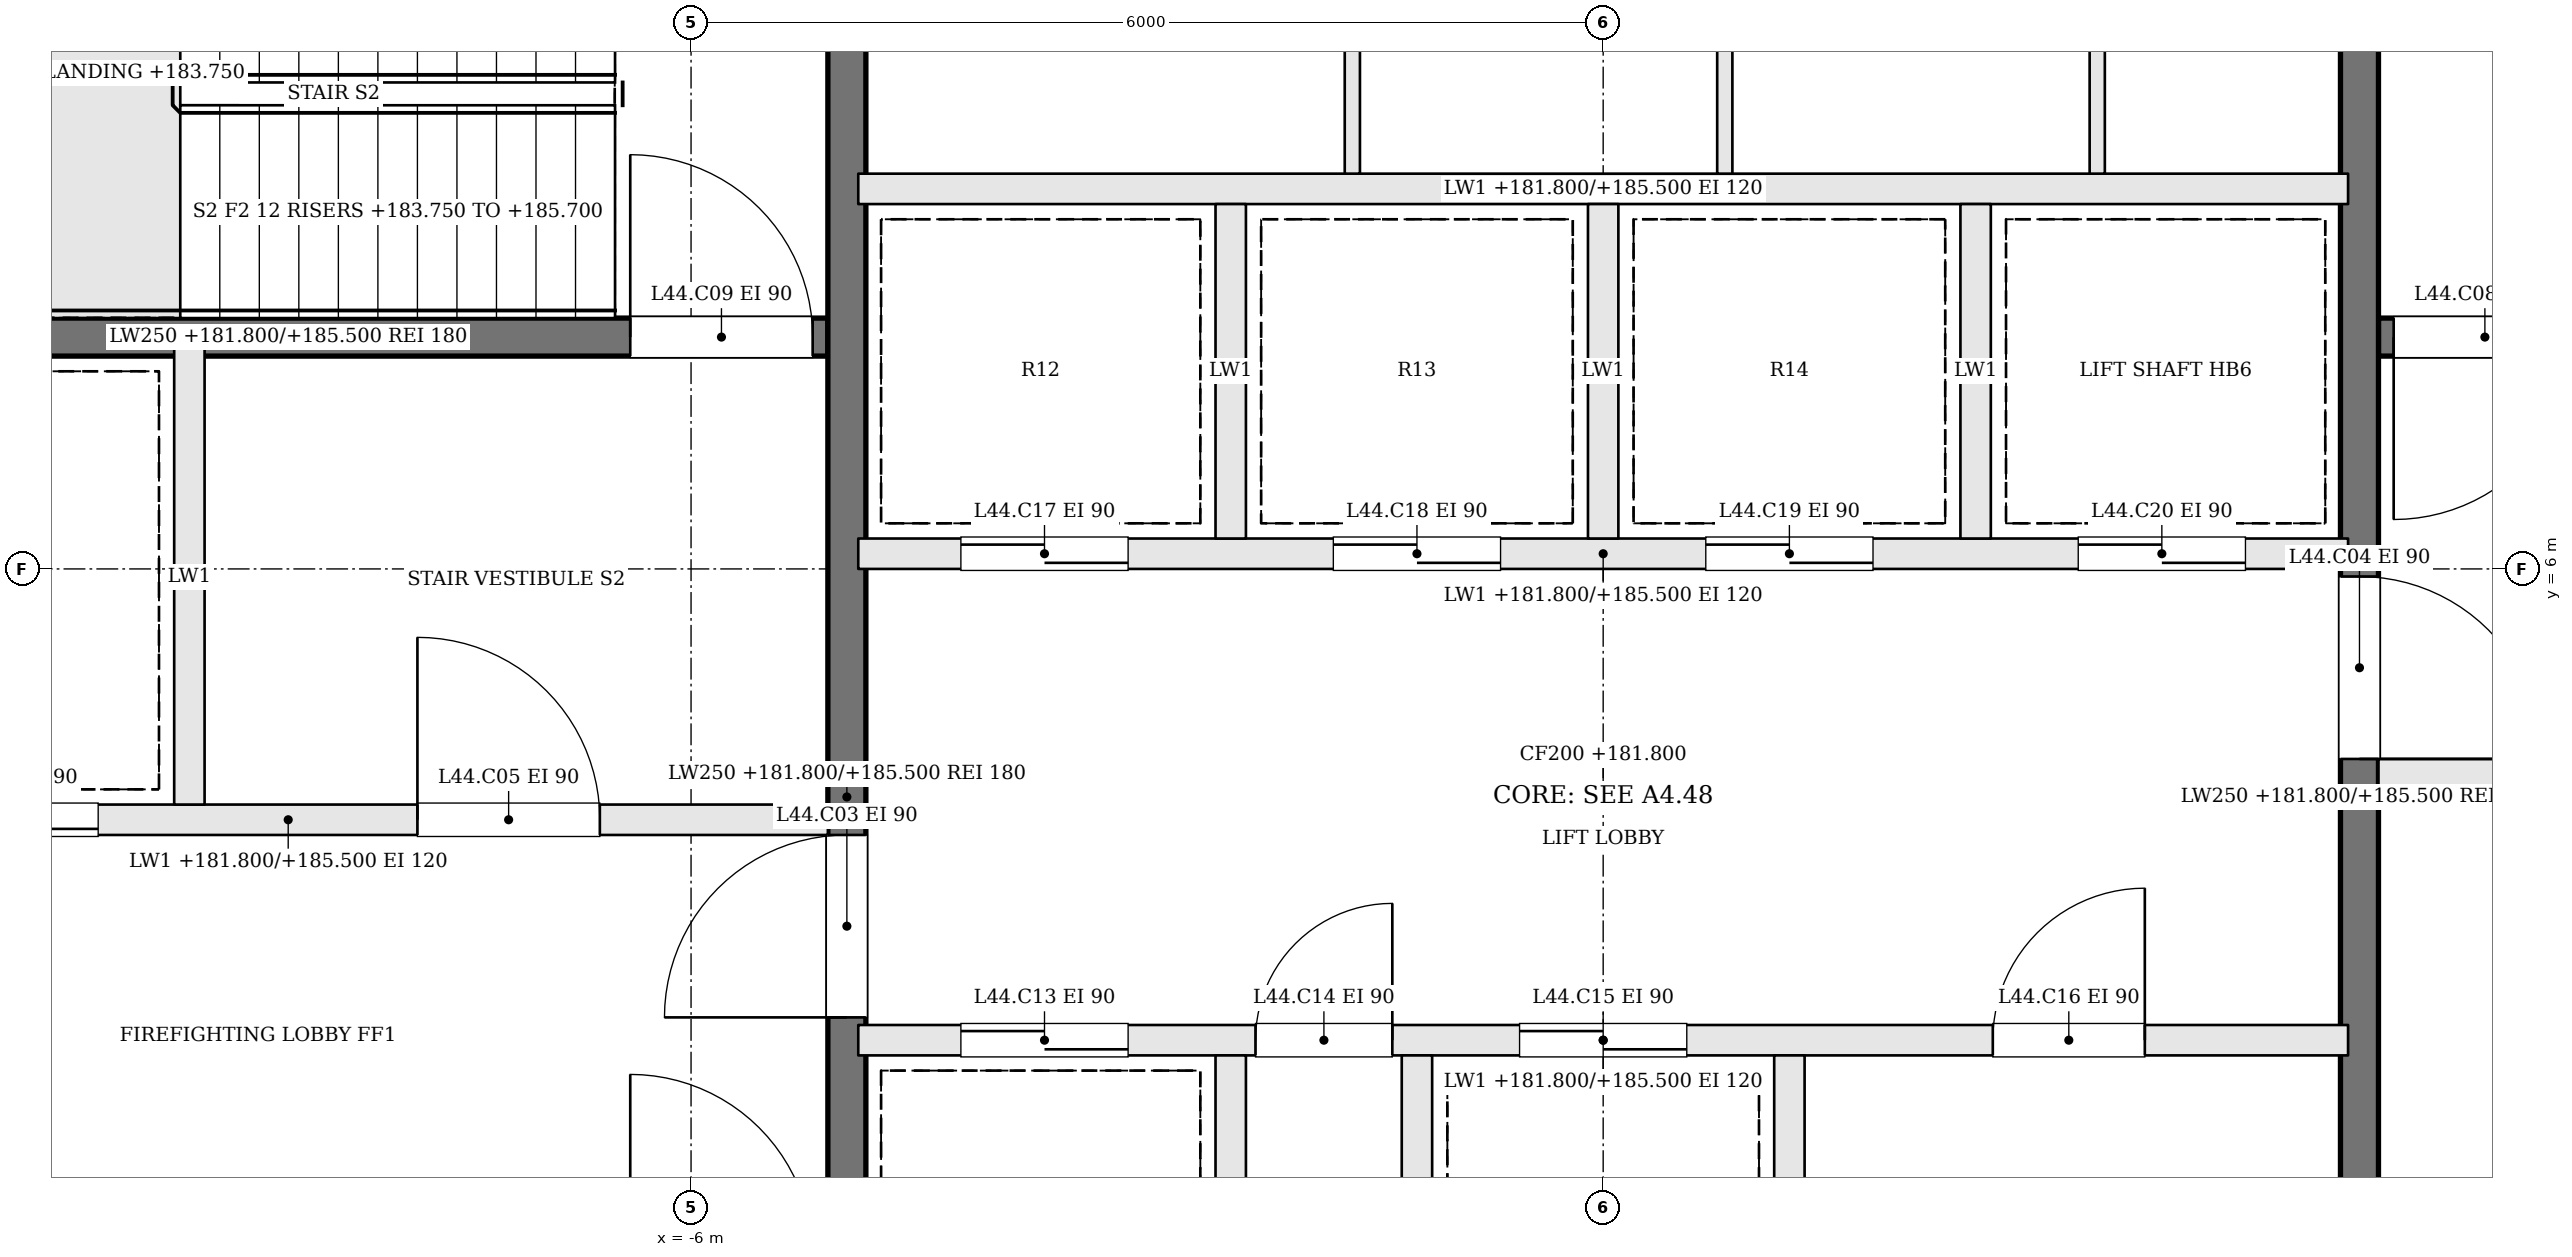
"""IFC4 building model, lengths in metres.
Left out: names, types, materials, properties, quantities, classifications, styles, units other than length and angle.
Written with IfcOpenShell. Run it as: python <this file> out.ifc"""

import sys

from ifc_helpers import new_model, si_unit, direction, frame, frame_2d, origin, place, context, subcontext, project, spatial, rectangle, extrude, element, fill, save


model = new_model("IFC4")
c1 = context("Model", 3, precision=1e-05, world=origin(), true_north=direction((0.0, 1.0)))
c2 = subcontext(c1, "Body", "Model", "MODEL_VIEW")
j1 = project(units=[si_unit("LENGTHUNIT", "METRE"), si_unit("PLANEANGLEUNIT", "RADIAN")], contexts=[c1])
p1 = place(None, origin())
s1 = spatial("IfcSite", under=j1, at=p1, CompositionType="ELEMENT")
p2 = place(p1, origin())
s2 = spatial("IfcBuilding", under=s1, at=p2, CompositionType="ELEMENT")
p3 = place(p2, frame((0.0, 0.0, 181.8)))
s3 = spatial("IfcBuildingStorey", under=s2, at=p3, CompositionType="ELEMENT", Elevation=181.8)
p4 = place(p3, frame((12.2, 7.525, 0.0), z_axis=(0.0, 0.0, 1.0), x_axis=(-1.0, 0.0, 0.0)))
e1 = element("IfcWall", 1, at=p4, inside=s3, PredefinedType="SOLIDWALL", context=c2, shape_type="SweptSolid", body=[
    extrude(rectangle(XDim=7.1, YDim=0.25, at=frame_2d((3.55, 0.0))), origin(), (0.0, 0.0, 1.0), 3.7),
])
p5 = place(p4, frame((5.8, 0.0, 0.0)))
e2 = element("IfcOpeningElement", 2, at=p5, cuts=e1, PredefinedType="OPENING", context=c2, shape_type="SweptSolid", body=[
    extrude(rectangle(XDim=1.2, YDim=2.1, at=frame_2d((0.6, 1.05))), frame((0.0, 0.135, 0.0), z_axis=(0.0, -1.0, 0.0), x_axis=(1.0, 0.0, 0.0)), (0.0, 0.0, 1.0), 0.27),
])
p6 = place(p3, frame((-12.2, 4.35, 0.0), z_axis=(0.0, 0.0, 1.0), x_axis=(1.0, 0.0, 0.0)))
e3 = element("IfcWall", 3, at=p6, inside=s3, PredefinedType="SOLIDWALL", context=c2, shape_type="SweptSolid", body=[
    extrude(rectangle(XDim=7.1, YDim=0.2, at=frame_2d((3.55, 0.0))), origin(), (0.0, 0.0, 1.0), 3.7),
])
p7 = place(p6, frame((4.4, 0.0, 0.0)))
e4 = element("IfcOpeningElement", 4, at=p7, cuts=e3, PredefinedType="OPENING", context=c2, shape_type="SweptSolid", body=[
    extrude(rectangle(XDim=1.2, YDim=2.1, at=frame_2d((0.6, 1.05))), frame((0.0, 0.11, 0.0), z_axis=(0.0, -1.0, 0.0), x_axis=(1.0, 0.0, 0.0)), (0.0, 0.0, 1.0), 0.22),
])
p8 = place(p6, frame((1.1, 0.0, 0.0)))
e5 = element("IfcOpeningElement", 5, at=p8, cuts=e3, PredefinedType="OPENING", context=c2, shape_type="SweptSolid", body=[
    extrude(rectangle(XDim=1.2, YDim=2.1, at=frame_2d((0.6, 1.05))), frame((0.0, 0.11, 0.0), z_axis=(0.0, -1.0, 0.0), x_axis=(1.0, 0.0, 0.0)), (0.0, 0.0, 1.0), 0.22),
])
p9 = place(p3, frame((12.2, 4.65, 0.0), z_axis=(0.0, 0.0, 1.0), x_axis=(-1.0, 0.0, 0.0)))
e6 = element("IfcWall", 6, at=p9, inside=s3, PredefinedType="SOLIDWALL", context=c2, shape_type="SweptSolid", body=[
    extrude(rectangle(XDim=7.1, YDim=0.2, at=frame_2d((3.55, 0.0))), origin(), (0.0, 0.0, 1.0), 3.7),
])
p10 = place(p9, frame((4.4, 0.0, 0.0)))
e7 = element("IfcOpeningElement", 7, at=p10, cuts=e6, PredefinedType="OPENING", context=c2, shape_type="SweptSolid", body=[
    extrude(rectangle(XDim=1.2, YDim=2.1, at=frame_2d((0.6, 1.05))), frame((0.0, 0.11, 0.0), z_axis=(0.0, -1.0, 0.0), x_axis=(1.0, 0.0, 0.0)), (0.0, 0.0, 1.0), 0.22),
])
p11 = place(p9, frame((1.1, 0.0, 0.0)))
e8 = element("IfcOpeningElement", 8, at=p11, cuts=e6, PredefinedType="OPENING", context=c2, shape_type="SweptSolid", body=[
    extrude(rectangle(XDim=1.2, YDim=2.1, at=frame_2d((0.6, 1.05))), frame((0.0, 0.11, 0.0), z_axis=(0.0, -1.0, 0.0), x_axis=(1.0, 0.0, 0.0)), (0.0, 0.0, 1.0), 0.22),
])
p12 = place(p3, frame((-12.2, 7.525, 0.0), z_axis=(0.0, 0.0, 1.0), x_axis=(1.0, 0.0, 0.0)))
e9 = element("IfcWall", 9, at=p12, inside=s3, PredefinedType="SOLIDWALL", context=c2, shape_type="SweptSolid", body=[
    extrude(rectangle(XDim=7.1, YDim=0.25, at=frame_2d((3.55, 0.0))), origin(), (0.0, 0.0, 1.0), 3.7),
])
p13 = place(p12, frame((5.8, 0.0, 0.0)))
e10 = element("IfcOpeningElement", 10, at=p13, cuts=e9, PredefinedType="OPENING", context=c2, shape_type="SweptSolid", body=[
    extrude(rectangle(XDim=1.2, YDim=2.1, at=frame_2d((0.6, 1.05))), frame((0.0, 0.135, 0.0), z_axis=(0.0, -1.0, 0.0), x_axis=(1.0, 0.0, 0.0)), (0.0, 0.0, 1.0), 0.27),
])
p14 = place(p3, frame((-9.3, 4.45, 0.0), z_axis=(0.0, 0.0, 1.0), x_axis=(0.0, 1.0, 0.0)))
e11 = element("IfcWall", 11, at=p14, inside=s3, PredefinedType="SOLIDWALL", context=c2, shape_type="SweptSolid", body=[
    extrude(rectangle(XDim=3.0, YDim=0.2, at=frame_2d((1.5, 0.0))), origin(), (0.0, 0.0, 1.0), 3.7),
])
p15 = place(p3, frame((-4.975, -2.2, 0.0), z_axis=(0.0, 0.0, 1.0), x_axis=(0.0, 1.0, 0.0)))
e12 = element("IfcWall", 12, at=p15, inside=s3, PredefinedType="SOLIDWALL", context=c2, shape_type="SweptSolid", body=[
    extrude(rectangle(XDim=13.4, YDim=0.25, at=frame_2d((6.7, 0.0))), origin(), (0.0, 0.0, 1.0), 3.7),
])
p16 = place(p15, frame((5.25, 0.0, 0.0)))
e13 = element("IfcOpeningElement", 13, at=p16, cuts=e12, PredefinedType="OPENING", context=c2, shape_type="SweptSolid", body=[
    extrude(rectangle(XDim=1.2, YDim=2.1, at=frame_2d((0.6, 1.05))), frame((0.0, 0.135, 0.0), z_axis=(0.0, -1.0, 0.0), x_axis=(1.0, 0.0, 0.0)), (0.0, 0.0, 1.0), 0.27),
])
p17 = place(p3, frame((4.975, 11.2, 0.0), z_axis=(0.0, 0.0, 1.0), x_axis=(0.0, -1.0, 0.0)))
e14 = element("IfcWall", 14, at=p17, inside=s3, PredefinedType="SOLIDWALL", context=c2, shape_type="SweptSolid", body=[
    extrude(rectangle(XDim=13.4, YDim=0.25, at=frame_2d((6.7, 0.0))), origin(), (0.0, 0.0, 1.0), 3.7),
])
p18 = place(p17, frame((5.25, 0.0, 0.0)))
e15 = element("IfcOpeningElement", 15, at=p18, cuts=e14, PredefinedType="OPENING", context=c2, shape_type="SweptSolid", body=[
    extrude(rectangle(XDim=1.2, YDim=2.1, at=frame_2d((0.6, 1.05))), frame((0.0, 0.135, 0.0), z_axis=(0.0, -1.0, 0.0), x_axis=(1.0, 0.0, 0.0)), (0.0, 0.0, 1.0), 0.27),
])
p19 = place(p3, frame((-4.9, 2.9, 0.0), z_axis=(0.0, 0.0, 1.0), x_axis=(1.0, 0.0, 0.0)))
e16 = element("IfcWall", 16, at=p19, inside=s3, PredefinedType="SOLIDWALL", context=c2, shape_type="SweptSolid", body=[
    extrude(rectangle(XDim=9.8, YDim=0.2, at=frame_2d((4.9, 0.0))), origin(), (0.0, 0.0, 1.0), 3.7),
])
p20 = place(p19, frame((0.675, 0.0, 0.0)))
e17 = element("IfcOpeningElement", 17, at=p20, cuts=e16, PredefinedType="OPENING", context=c2, shape_type="SweptSolid", body=[
    extrude(rectangle(XDim=1.1, YDim=2.1, at=frame_2d((0.55, 1.05))), frame((0.0, 0.11, 0.0), z_axis=(0.0, -1.0, 0.0), x_axis=(1.0, 0.0, 0.0)), (0.0, 0.0, 1.0), 0.22),
])
p21 = place(p19, frame((2.613, 0.0, 0.0)))
e18 = element("IfcOpeningElement", 18, at=p21, cuts=e16, PredefinedType="OPENING", context=c2, shape_type="SweptSolid", body=[
    extrude(rectangle(XDim=0.9, YDim=2.1, at=frame_2d((0.45, 1.05))), frame((0.0, 0.11, 0.0), z_axis=(0.0, -1.0, 0.0), x_axis=(1.0, 0.0, 0.0)), (0.0, 0.0, 1.0), 0.22),
])
p22 = place(p19, frame((4.35, 0.0, 0.0)))
e19 = element("IfcOpeningElement", 19, at=p22, cuts=e16, PredefinedType="OPENING", context=c2, shape_type="SweptSolid", body=[
    extrude(rectangle(XDim=1.1, YDim=2.1, at=frame_2d((0.55, 1.05))), frame((0.0, 0.11, 0.0), z_axis=(0.0, -1.0, 0.0), x_axis=(1.0, 0.0, 0.0)), (0.0, 0.0, 1.0), 0.22),
])
p23 = place(p19, frame((7.463, 0.0, 0.0)))
e20 = element("IfcOpeningElement", 20, at=p23, cuts=e16, PredefinedType="OPENING", context=c2, shape_type="SweptSolid", body=[
    extrude(rectangle(XDim=1.0, YDim=2.1, at=frame_2d((0.5, 1.05))), frame((0.0, 0.11, 0.0), z_axis=(0.0, -1.0, 0.0), x_axis=(1.0, 0.0, 0.0)), (0.0, 0.0, 1.0), 0.22),
])
p24 = place(p3, frame((-4.9, 6.1, 0.0), z_axis=(0.0, 0.0, 1.0), x_axis=(1.0, 0.0, 0.0)))
e21 = element("IfcWall", 21, at=p24, inside=s3, PredefinedType="SOLIDWALL", context=c2, shape_type="SweptSolid", body=[
    extrude(rectangle(XDim=9.8, YDim=0.2, at=frame_2d((4.9, 0.0))), origin(), (0.0, 0.0, 1.0), 3.7),
])
p25 = place(p24, frame((0.675, 0.0, 0.0)))
e22 = element("IfcOpeningElement", 22, at=p25, cuts=e21, PredefinedType="OPENING", context=c2, shape_type="SweptSolid", body=[
    extrude(rectangle(XDim=1.1, YDim=2.1, at=frame_2d((0.55, 1.05))), frame((0.0, 0.11, 0.0), z_axis=(0.0, -1.0, 0.0), x_axis=(1.0, 0.0, 0.0)), (0.0, 0.0, 1.0), 0.22),
])
p26 = place(p24, frame((3.125, 0.0, 0.0)))
e23 = element("IfcOpeningElement", 23, at=p26, cuts=e21, PredefinedType="OPENING", context=c2, shape_type="SweptSolid", body=[
    extrude(rectangle(XDim=1.1, YDim=2.1, at=frame_2d((0.55, 1.05))), frame((0.0, 0.11, 0.0), z_axis=(0.0, -1.0, 0.0), x_axis=(1.0, 0.0, 0.0)), (0.0, 0.0, 1.0), 0.22),
])
p27 = place(p24, frame((5.575, 0.0, 0.0)))
e24 = element("IfcOpeningElement", 24, at=p27, cuts=e21, PredefinedType="OPENING", context=c2, shape_type="SweptSolid", body=[
    extrude(rectangle(XDim=1.1, YDim=2.1, at=frame_2d((0.55, 1.05))), frame((0.0, 0.11, 0.0), z_axis=(0.0, -1.0, 0.0), x_axis=(1.0, 0.0, 0.0)), (0.0, 0.0, 1.0), 0.22),
])
p28 = place(p24, frame((8.025, 0.0, 0.0)))
e25 = element("IfcOpeningElement", 25, at=p28, cuts=e21, PredefinedType="OPENING", context=c2, shape_type="SweptSolid", body=[
    extrude(rectangle(XDim=1.1, YDim=2.1, at=frame_2d((0.55, 1.05))), frame((0.0, 0.11, 0.0), z_axis=(0.0, -1.0, 0.0), x_axis=(1.0, 0.0, 0.0)), (0.0, 0.0, 1.0), 0.22),
])
p29 = place(p3, frame((-4.9, 8.5, 0.0), z_axis=(0.0, 0.0, 1.0), x_axis=(1.0, 0.0, 0.0)))
e26 = element("IfcWall", 26, at=p29, inside=s3, PredefinedType="SOLIDWALL", context=c2, shape_type="SweptSolid", body=[
    extrude(rectangle(XDim=9.8, YDim=0.2, at=frame_2d((4.9, 0.0))), origin(), (0.0, 0.0, 1.0), 3.7),
])
for number, where, z_axis, x_axis in (
    (27, (-2.45, 0.6, 0.0), (0.0, 0.0, 1.0), (0.0, 1.0, 0.0)),
    (28, (-1.225, 0.6, 0.0), (0.0, 0.0, 1.0), (0.0, 1.0, 0.0)),
    (29, (1.225, 0.6, 0.0), (0.0, 0.0, 1.0), (0.0, 1.0, 0.0)),
    (30, (-2.45, 6.2, 0.0), (0.0, 0.0, 1.0), (0.0, 1.0, 0.0)),
    (31, (0.0, 6.2, 0.0), (0.0, 0.0, 1.0), (0.0, 1.0, 0.0)),
    (32, (2.45, 6.2, 0.0), (0.0, 0.0, 1.0), (0.0, 1.0, 0.0)),
):
    element("IfcWall", number, at=place(p3, frame(where, z_axis=z_axis, x_axis=x_axis)), inside=s3, PredefinedType="SOLIDWALL", context=c2, shape_type="SweptSolid", body=[
        extrude(rectangle(XDim=2.2, YDim=0.2, at=frame_2d((1.1, 0.0))), origin(), (0.0, 0.0, 1.0), 3.7),
    ])
for number, where, z_axis, x_axis in (
    (33, (-1.65, 8.6, 0.0), (0.0, 0.0, 1.0), (0.0, 1.0, 0.0)),
    (34, (0.8, 8.6, 0.0), (0.0, 0.0, 1.0), (0.0, 1.0, 0.0)),
    (35, (3.25, 8.6, 0.0), (0.0, 0.0, 1.0), (0.0, 1.0, 0.0)),
):
    element("IfcWall", number, at=place(p3, frame(where, z_axis=z_axis, x_axis=x_axis)), inside=s3, PredefinedType="PARTITIONING", context=c2, shape_type="SweptSolid", body=[
        extrude(rectangle(XDim=2.6, YDim=0.1, at=frame_2d((1.3, 0.0))), origin(), (0.0, 0.0, 1.0), 3.7),
    ])
p30 = place(p16, origin())
e36 = element("IfcDoor", 36, at=p30, inside=s3, OperationType="SINGLE_SWING_LEFT", PredefinedType="DOOR", context=c2, shape_type="SweptSolid", body=[
    extrude(rectangle(XDim=1.2, YDim=2.1, at=frame_2d((0.6, 1.05))), frame((0.0, 0.025, 0.0), z_axis=(0.0, -1.0, 0.0), x_axis=(1.0, 0.0, 0.0)), (0.0, 0.0, 1.0), 0.05),
])
fill(e13, e36)
p31 = place(p18, origin())
e37 = element("IfcDoor", 37, at=p31, inside=s3, OperationType="SINGLE_SWING_RIGHT", PredefinedType="DOOR", context=c2, shape_type="SweptSolid", body=[
    extrude(rectangle(XDim=1.2, YDim=2.1, at=frame_2d((0.6, 1.05))), frame((0.0, 0.025, 0.0), z_axis=(0.0, -1.0, 0.0), x_axis=(1.0, 0.0, 0.0)), (0.0, 0.0, 1.0), 0.05),
])
fill(e15, e37)
p32 = place(p7, origin())
e38 = element("IfcDoor", 38, at=p32, inside=s3, OperationType="SINGLE_SWING_LEFT", PredefinedType="DOOR", context=c2, shape_type="SweptSolid", body=[
    extrude(rectangle(XDim=1.2, YDim=2.1, at=frame_2d((0.6, 1.05))), frame((0.0, 0.025, 0.0), z_axis=(0.0, -1.0, 0.0), x_axis=(1.0, 0.0, 0.0)), (0.0, 0.0, 1.0), 0.05),
])
fill(e4, e38)
p33 = place(p5, origin())
e39 = element("IfcDoor", 39, at=p33, inside=s3, OperationType="SINGLE_SWING_RIGHT", PredefinedType="DOOR", context=c2, shape_type="SweptSolid", body=[
    extrude(rectangle(XDim=1.2, YDim=2.1, at=frame_2d((0.6, 1.05))), frame((0.0, 0.025, 0.0), z_axis=(0.0, -1.0, 0.0), x_axis=(1.0, 0.0, 0.0)), (0.0, 0.0, 1.0), 0.05),
])
fill(e2, e39)
p34 = place(p13, origin())
e40 = element("IfcDoor", 40, at=p34, inside=s3, OperationType="SINGLE_SWING_LEFT", PredefinedType="DOOR", context=c2, shape_type="SweptSolid", body=[
    extrude(rectangle(XDim=1.2, YDim=2.1, at=frame_2d((0.6, 1.05))), frame((0.0, 0.025, 0.0), z_axis=(0.0, -1.0, 0.0), x_axis=(1.0, 0.0, 0.0)), (0.0, 0.0, 1.0), 0.05),
])
fill(e10, e40)
p35 = place(p8, origin())
e41 = element("IfcDoor", 41, at=p35, inside=s3, OperationType="SLIDING_TO_RIGHT", PredefinedType="DOOR", context=c2, shape_type="SweptSolid", body=[
    extrude(rectangle(XDim=1.2, YDim=2.1, at=frame_2d((0.6, 1.05))), frame((0.0, 0.025, 0.0), z_axis=(0.0, -1.0, 0.0), x_axis=(1.0, 0.0, 0.0)), (0.0, 0.0, 1.0), 0.05),
])
fill(e5, e41)
p36 = place(p20, origin())
e42 = element("IfcDoor", 42, at=p36, inside=s3, OperationType="SLIDING_TO_RIGHT", PredefinedType="DOOR", context=c2, shape_type="SweptSolid", body=[
    extrude(rectangle(XDim=1.1, YDim=2.1, at=frame_2d((0.55, 1.05))), frame((0.0, 0.025, 0.0), z_axis=(0.0, -1.0, 0.0), x_axis=(1.0, 0.0, 0.0)), (0.0, 0.0, 1.0), 0.05),
])
fill(e17, e42)
p37 = place(p21, origin())
e43 = element("IfcDoor", 43, at=p37, inside=s3, OperationType="SINGLE_SWING_RIGHT", PredefinedType="DOOR", context=c2, shape_type="SweptSolid", body=[
    extrude(rectangle(XDim=0.9, YDim=2.1, at=frame_2d((0.45, 1.05))), frame((0.0, 0.025, 0.0), z_axis=(0.0, -1.0, 0.0), x_axis=(1.0, 0.0, 0.0)), (0.0, 0.0, 1.0), 0.05),
])
fill(e18, e43)
p38 = place(p22, origin())
e44 = element("IfcDoor", 44, at=p38, inside=s3, OperationType="SLIDING_TO_LEFT", PredefinedType="DOOR", context=c2, shape_type="SweptSolid", body=[
    extrude(rectangle(XDim=1.1, YDim=2.1, at=frame_2d((0.55, 1.05))), frame((0.0, 0.025, 0.0), z_axis=(0.0, -1.0, 0.0), x_axis=(1.0, 0.0, 0.0)), (0.0, 0.0, 1.0), 0.05),
])
fill(e19, e44)
p39 = place(p23, origin())
e45 = element("IfcDoor", 45, at=p39, inside=s3, OperationType="SINGLE_SWING_RIGHT", PredefinedType="DOOR", context=c2, shape_type="SweptSolid", body=[
    extrude(rectangle(XDim=1.0, YDim=2.1, at=frame_2d((0.5, 1.05))), frame((0.0, 0.025, 0.0), z_axis=(0.0, -1.0, 0.0), x_axis=(1.0, 0.0, 0.0)), (0.0, 0.0, 1.0), 0.05),
])
fill(e20, e45)
p40 = place(p25, origin())
e46 = element("IfcDoor", 46, at=p40, inside=s3, OperationType="SLIDING_TO_RIGHT", PredefinedType="DOOR", context=c2, shape_type="SweptSolid", body=[
    extrude(rectangle(XDim=1.1, YDim=2.1, at=frame_2d((0.55, 1.05))), frame((0.0, 0.025, 0.0), z_axis=(0.0, -1.0, 0.0), x_axis=(1.0, 0.0, 0.0)), (0.0, 0.0, 1.0), 0.05),
])
fill(e22, e46)
p41 = place(p26, origin())
e47 = element("IfcDoor", 47, at=p41, inside=s3, OperationType="SLIDING_TO_LEFT", PredefinedType="DOOR", context=c2, shape_type="SweptSolid", body=[
    extrude(rectangle(XDim=1.1, YDim=2.1, at=frame_2d((0.55, 1.05))), frame((0.0, 0.025, 0.0), z_axis=(0.0, -1.0, 0.0), x_axis=(1.0, 0.0, 0.0)), (0.0, 0.0, 1.0), 0.05),
])
fill(e23, e47)
p42 = place(p27, origin())
e48 = element("IfcDoor", 48, at=p42, inside=s3, OperationType="SLIDING_TO_RIGHT", PredefinedType="DOOR", context=c2, shape_type="SweptSolid", body=[
    extrude(rectangle(XDim=1.1, YDim=2.1, at=frame_2d((0.55, 1.05))), frame((0.0, 0.025, 0.0), z_axis=(0.0, -1.0, 0.0), x_axis=(1.0, 0.0, 0.0)), (0.0, 0.0, 1.0), 0.05),
])
fill(e24, e48)
p43 = place(p28, origin())
e49 = element("IfcDoor", 49, at=p43, inside=s3, OperationType="SLIDING_TO_LEFT", PredefinedType="DOOR", context=c2, shape_type="SweptSolid", body=[
    extrude(rectangle(XDim=1.1, YDim=2.1, at=frame_2d((0.55, 1.05))), frame((0.0, 0.025, 0.0), z_axis=(0.0, -1.0, 0.0), x_axis=(1.0, 0.0, 0.0)), (0.0, 0.0, 1.0), 0.05),
])
fill(e25, e49)
save(model, sys.argv[1])
